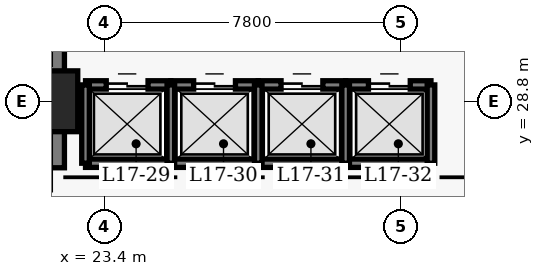
"""IFC4 building model, lengths in metres.
Left out: names, types, materials, properties, quantities, classifications, styles, units other than length and angle.
Written with IfcOpenShell. Run it as: python <this file> out.ifc"""

import sys

from ifc_helpers import new_model, si_unit, direction, frame, frame_2d, origin, origin_2d, place, context, subcontext, project, spatial, rectangle, extrude, element, fill, save


model = new_model("IFC4")
c1 = context("Model", 3, precision=1e-05, world=origin(), true_north=direction((0.0, 1.0)))
c2 = subcontext(c1, "Body", "Model", "MODEL_VIEW")
j1 = project(units=[si_unit("LENGTHUNIT", "METRE"), si_unit("PLANEANGLEUNIT", "RADIAN")], contexts=[c1])
p1 = place(None, origin())
s1 = spatial("IfcSite", under=j1, at=p1, CompositionType="ELEMENT")
p2 = place(p1, origin())
s2 = spatial("IfcBuilding", under=s1, at=p2, CompositionType="ELEMENT")
p3 = place(p2, frame((0.0, 0.0, 71.6)))
s3 = spatial("IfcBuildingStorey", under=s2, at=p3, CompositionType="ELEMENT", Elevation=71.6)
p4 = place(p3, frame((21.9, 27.05, 0.0), z_axis=(0.0, 0.0, 1.0), x_axis=(0.0, 1.0, 0.0)))
e1 = element("IfcWall", 1, at=p4, inside=s3, PredefinedType="SHEAR", context=c2, shape_type="SweptSolid", body=[
    extrude(rectangle(XDim=13.72, YDim=0.9, at=frame_2d((6.86, 0.0))), origin(), (0.0, 0.0, 1.0), 3.8),
])
p5 = place(p3, frame((21.9, 28.8, 0.0), z_axis=(0.0, 0.0, 1.0), x_axis=(1.0, 0.0, 0.0)))
e2 = element("IfcColumn", 2, at=p5, inside=s3, PredefinedType="COLUMN", context=c2, shape_type="SweptSolid", body=[
    extrude(rectangle(XDim=1.6, YDim=1.6, at=origin_2d()), origin(), (0.0, 0.0, 1.0), 3.8),
])
p6 = place(p3, frame((22.905, 29.23, 0.0), z_axis=(0.0, 0.0, 1.0), x_axis=(1.0, 0.0, 0.0)))
e3 = element("IfcWall", 3, at=p6, inside=s3, PredefinedType="SHEAR", context=c2, shape_type="SweptSolid", body=[
    extrude(rectangle(XDim=2.245, YDim=0.22, at=frame_2d((1.123, 0.0))), origin(), (0.0, 0.0, 1.0), 3.8),
])
p7 = place(p6, frame((0.545, 0.0, 0.0)))
e4 = element("IfcOpeningElement", 4, at=p7, cuts=e3, PredefinedType="OPENING", context=c2, shape_type="SweptSolid", body=[
    extrude(rectangle(XDim=1.1, YDim=2.15, at=frame_2d((0.55, 1.075))), frame((0.0, 0.12, 0.0), z_axis=(0.0, -1.0, 0.0), x_axis=(1.0, 0.0, 0.0)), (0.0, 0.0, 1.0), 0.24),
])
p8 = place(p3, frame((22.905, 27.17, 0.0), z_axis=(0.0, 0.0, 1.0), x_axis=(1.0, 0.0, 0.0)))
e5 = element("IfcWall", 5, at=p8, inside=s3, PredefinedType="SHEAR", context=c2, shape_type="SweptSolid", body=[
    extrude(rectangle(XDim=2.245, YDim=0.22, at=frame_2d((1.123, 0.0))), origin(), (0.0, 0.0, 1.0), 3.8),
])
p9 = place(p3, frame((22.905, 27.17, 0.0), z_axis=(0.0, 0.0, 1.0), x_axis=(0.0, 1.0, 0.0)))
e6 = element("IfcWall", 6, at=p9, inside=s3, PredefinedType="SHEAR", context=c2, shape_type="SweptSolid", body=[
    extrude(rectangle(XDim=2.06, YDim=0.2, at=frame_2d((1.03, 0.0))), origin(), (0.0, 0.0, 1.0), 3.8),
])
p10 = place(p3, frame((25.15, 29.23, 0.0), z_axis=(0.0, 0.0, 1.0), x_axis=(1.0, 0.0, 0.0)))
e7 = element("IfcWall", 7, at=p10, inside=s3, PredefinedType="SHEAR", context=c2, shape_type="SweptSolid", body=[
    extrude(rectangle(XDim=2.3, YDim=0.22, at=frame_2d((1.15, 0.0))), origin(), (0.0, 0.0, 1.0), 3.8),
])
p11 = place(p10, frame((0.6, 0.0, 0.0)))
e8 = element("IfcOpeningElement", 8, at=p11, cuts=e7, PredefinedType="OPENING", context=c2, shape_type="SweptSolid", body=[
    extrude(rectangle(XDim=1.1, YDim=2.15, at=frame_2d((0.55, 1.075))), frame((0.0, 0.12, 0.0), z_axis=(0.0, -1.0, 0.0), x_axis=(1.0, 0.0, 0.0)), (0.0, 0.0, 1.0), 0.24),
])
p12 = place(p3, frame((25.15, 27.17, 0.0), z_axis=(0.0, 0.0, 1.0), x_axis=(1.0, 0.0, 0.0)))
e9 = element("IfcWall", 9, at=p12, inside=s3, PredefinedType="SHEAR", context=c2, shape_type="SweptSolid", body=[
    extrude(rectangle(XDim=2.3, YDim=0.22, at=frame_2d((1.15, 0.0))), origin(), (0.0, 0.0, 1.0), 3.8),
])
p13 = place(p3, frame((25.15, 27.17, 0.0), z_axis=(0.0, 0.0, 1.0), x_axis=(0.0, 1.0, 0.0)))
e10 = element("IfcWall", 10, at=p13, inside=s3, PredefinedType="SHEAR", context=c2, shape_type="SweptSolid", body=[
    extrude(rectangle(XDim=2.06, YDim=0.2, at=frame_2d((1.03, 0.0))), origin(), (0.0, 0.0, 1.0), 3.8),
])
p14 = place(p3, frame((27.45, 29.23, 0.0), z_axis=(0.0, 0.0, 1.0), x_axis=(1.0, 0.0, 0.0)))
e11 = element("IfcWall", 11, at=p14, inside=s3, PredefinedType="SHEAR", context=c2, shape_type="SweptSolid", body=[
    extrude(rectangle(XDim=2.3, YDim=0.22, at=frame_2d((1.15, 0.0))), origin(), (0.0, 0.0, 1.0), 3.8),
])
p15 = place(p14, frame((0.6, 0.0, 0.0)))
e12 = element("IfcOpeningElement", 12, at=p15, cuts=e11, PredefinedType="OPENING", context=c2, shape_type="SweptSolid", body=[
    extrude(rectangle(XDim=1.1, YDim=2.15, at=frame_2d((0.55, 1.075))), frame((0.0, 0.12, 0.0), z_axis=(0.0, -1.0, 0.0), x_axis=(1.0, 0.0, 0.0)), (0.0, 0.0, 1.0), 0.24),
])
p16 = place(p3, frame((27.45, 27.17, 0.0), z_axis=(0.0, 0.0, 1.0), x_axis=(1.0, 0.0, 0.0)))
e13 = element("IfcWall", 13, at=p16, inside=s3, PredefinedType="SHEAR", context=c2, shape_type="SweptSolid", body=[
    extrude(rectangle(XDim=2.3, YDim=0.22, at=frame_2d((1.15, 0.0))), origin(), (0.0, 0.0, 1.0), 3.8),
])
p17 = place(p3, frame((27.45, 27.17, 0.0), z_axis=(0.0, 0.0, 1.0), x_axis=(0.0, 1.0, 0.0)))
e14 = element("IfcWall", 14, at=p17, inside=s3, PredefinedType="SHEAR", context=c2, shape_type="SweptSolid", body=[
    extrude(rectangle(XDim=2.06, YDim=0.2, at=frame_2d((1.03, 0.0))), origin(), (0.0, 0.0, 1.0), 3.8),
])
p18 = place(p3, frame((29.75, 29.23, 0.0), z_axis=(0.0, 0.0, 1.0), x_axis=(1.0, 0.0, 0.0)))
e15 = element("IfcWall", 15, at=p18, inside=s3, PredefinedType="SHEAR", context=c2, shape_type="SweptSolid", body=[
    extrude(rectangle(XDim=2.245, YDim=0.22, at=frame_2d((1.123, 0.0))), origin(), (0.0, 0.0, 1.0), 3.8),
])
p19 = place(p18, frame((0.6, 0.0, 0.0)))
e16 = element("IfcOpeningElement", 16, at=p19, cuts=e15, PredefinedType="OPENING", context=c2, shape_type="SweptSolid", body=[
    extrude(rectangle(XDim=1.1, YDim=2.15, at=frame_2d((0.55, 1.075))), frame((0.0, 0.12, 0.0), z_axis=(0.0, -1.0, 0.0), x_axis=(1.0, 0.0, 0.0)), (0.0, 0.0, 1.0), 0.24),
])
p20 = place(p3, frame((29.75, 27.17, 0.0), z_axis=(0.0, 0.0, 1.0), x_axis=(1.0, 0.0, 0.0)))
e17 = element("IfcWall", 17, at=p20, inside=s3, PredefinedType="SHEAR", context=c2, shape_type="SweptSolid", body=[
    extrude(rectangle(XDim=2.245, YDim=0.22, at=frame_2d((1.123, 0.0))), origin(), (0.0, 0.0, 1.0), 3.8),
])
for number, where, z_axis, x_axis in (
    (18, (29.75, 27.17, 0.0), (0.0, 0.0, 1.0), (0.0, 1.0, 0.0)),
    (19, (31.995, 27.17, 0.0), (0.0, 0.0, 1.0), (0.0, 1.0, 0.0)),
):
    element("IfcWall", number, at=place(p3, frame(where, z_axis=z_axis, x_axis=x_axis)), inside=s3, PredefinedType="SHEAR", context=c2, shape_type="SweptSolid", body=[
        extrude(rectangle(XDim=2.06, YDim=0.2, at=frame_2d((1.03, 0.0))), origin(), (0.0, 0.0, 1.0), 3.8),
    ])
p21 = place(p7, origin())
e20 = element("IfcDoor", 20, at=p21, inside=s3, OperationType="DOUBLE_DOOR_SLIDING", PredefinedType="DOOR", context=c2, shape_type="SweptSolid", body=[
    extrude(rectangle(XDim=1.1, YDim=2.15, at=frame_2d((0.55, 1.075))), frame((0.0, 0.025, 0.0), z_axis=(0.0, -1.0, 0.0), x_axis=(1.0, 0.0, 0.0)), (0.0, 0.0, 1.0), 0.05),
])
fill(e4, e20)
p22 = place(p11, origin())
e21 = element("IfcDoor", 21, at=p22, inside=s3, OperationType="DOUBLE_DOOR_SLIDING", PredefinedType="DOOR", context=c2, shape_type="SweptSolid", body=[
    extrude(rectangle(XDim=1.1, YDim=2.15, at=frame_2d((0.55, 1.075))), frame((0.0, 0.025, 0.0), z_axis=(0.0, -1.0, 0.0), x_axis=(1.0, 0.0, 0.0)), (0.0, 0.0, 1.0), 0.05),
])
fill(e8, e21)
p23 = place(p15, origin())
e22 = element("IfcDoor", 22, at=p23, inside=s3, OperationType="DOUBLE_DOOR_SLIDING", PredefinedType="DOOR", context=c2, shape_type="SweptSolid", body=[
    extrude(rectangle(XDim=1.1, YDim=2.15, at=frame_2d((0.55, 1.075))), frame((0.0, 0.025, 0.0), z_axis=(0.0, -1.0, 0.0), x_axis=(1.0, 0.0, 0.0)), (0.0, 0.0, 1.0), 0.05),
])
fill(e12, e22)
p24 = place(p19, origin())
e23 = element("IfcDoor", 23, at=p24, inside=s3, OperationType="DOUBLE_DOOR_SLIDING", PredefinedType="DOOR", context=c2, shape_type="SweptSolid", body=[
    extrude(rectangle(XDim=1.1, YDim=2.15, at=frame_2d((0.55, 1.075))), frame((0.0, 0.025, 0.0), z_axis=(0.0, -1.0, 0.0), x_axis=(1.0, 0.0, 0.0)), (0.0, 0.0, 1.0), 0.05),
])
fill(e16, e23)
save(model, sys.argv[1])
